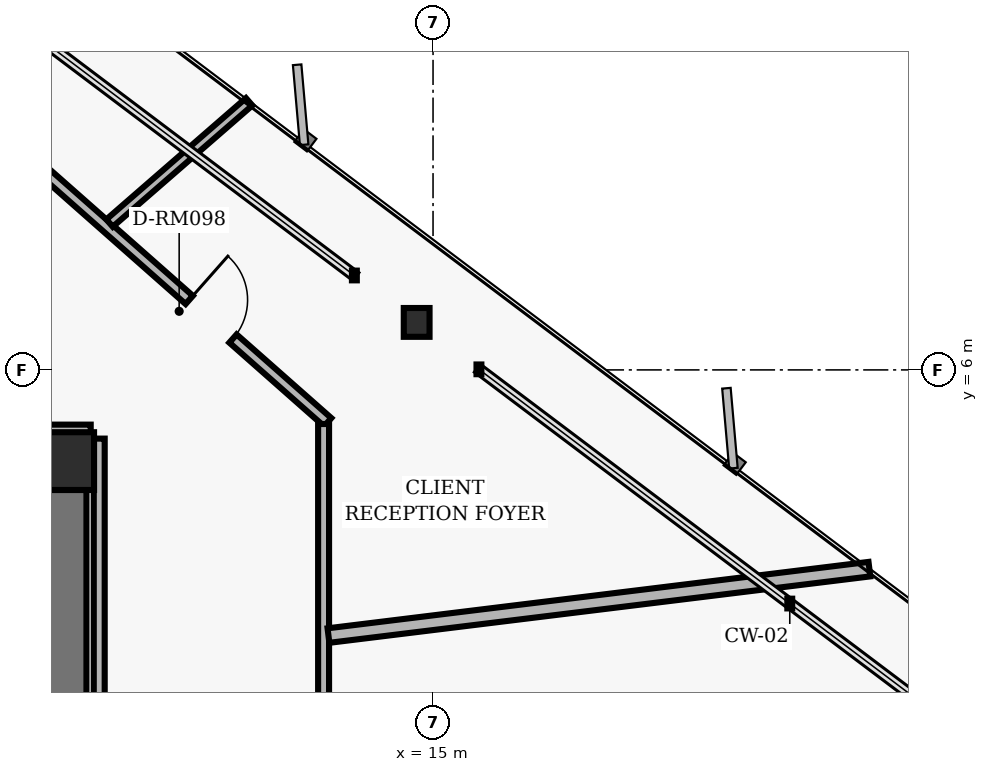
"""IFC4 building model, lengths in metres.
Left out: names, types, materials, properties, quantities, classifications, styles, units other than length and angle.
Written with IfcOpenShell. Run it as: python <this file> out.ifc"""

import sys

from ifc_helpers import new_model, si_unit, direction, frame, frame_2d, origin, origin_2d, place, context, subcontext, project, spatial, rectangle, hollow_rectangle, i_section, extrude, element, fill, save


model = new_model("IFC4")
c1 = context("Model", 3, precision=1e-05, world=origin(), true_north=direction((0.0, 1.0)))
c2 = subcontext(c1, "Body", "Model", "MODEL_VIEW")
j1 = project(units=[si_unit("LENGTHUNIT", "METRE"), si_unit("PLANEANGLEUNIT", "RADIAN")], contexts=[c1])
p1 = place(None, origin())
s1 = spatial("IfcSite", under=j1, at=p1, CompositionType="ELEMENT")
p2 = place(p1, origin())
s2 = spatial("IfcBuilding", under=s1, at=p2, CompositionType="ELEMENT")
p3 = place(p2, frame((0.0, 0.0, 59.68)))
s3 = spatial("IfcBuildingStorey", under=s2, at=p3, CompositionType="ELEMENT", Elevation=59.68)
p4 = place(p3, frame((8.95, 4.5, 0.0), z_axis=(0.0, 0.0, 1.0), x_axis=(1.0, 0.0, 0.0)))
e1 = element("IfcColumn", 1, at=p4, inside=s3, PredefinedType="COLUMN", context=c2, shape_type="SweptSolid", body=[
    extrude(hollow_rectangle(XDim=0.95, YDim=0.95, WallThickness=0.06, InnerFilletRadius=0.02, OuterFilletRadius=0.04, at=origin_2d()), origin(), (0.0, 0.0, 1.0), 3.36),
])
p5 = place(p3, frame((8.95, -3.825, 0.0), z_axis=(0.0, 0.0, 1.0), x_axis=(0.0, 1.0, 0.0)))
e2 = element("IfcWall", 2, at=p5, inside=s3, PredefinedType="SHEAR", context=c2, shape_type="SweptSolid", body=[
    extrude(rectangle(XDim=7.85, YDim=0.7, at=frame_2d((3.925, 0.0))), origin(), (0.0, 0.0, 1.0), 3.098),
])
p6 = place(p3, frame((14.73, 6.781, 0.0), z_axis=(0.0, 0.0, 1.0), x_axis=(1.0, 0.0, 0.0)))
e3 = element("IfcColumn", 3, at=p6, inside=s3, PredefinedType="COLUMN", context=c2, shape_type="SweptSolid", body=[
    extrude(i_section(OverallWidth=0.424, OverallDepth=0.474, WebThickness=0.048, FlangeThickness=0.077, FilletRadius=0.025, at=origin_2d()), origin(), (0.0, 0.0, 1.0), 3.36),
])
p7 = place(p3, frame((8.567, 9.29, 0.0), z_axis=(0.0, 0.0, 1.0), x_axis=(0.749626463267, -0.66186113768, 0.0)))
e4 = element("IfcWall", 4, at=p7, inside=s3, PredefinedType="PARTITIONING", context=c2, shape_type="SweptSolid", body=[
    extrude(rectangle(XDim=6.27, YDim=0.18, at=frame_2d((3.135, 0.0))), origin(), (0.0, 0.0, 1.0), 2.587),
])
p8 = place(p7, frame((3.232, 0.0, 0.0)))
e5 = element("IfcOpeningElement", 5, at=p8, cuts=e4, PredefinedType="OPENING", context=c2, shape_type="SweptSolid", body=[
    extrude(rectangle(XDim=0.96, YDim=2.02, at=frame_2d((0.48, 1.01))), frame((0.0, 0.1, 0.0), z_axis=(0.0, -1.0, 0.0), x_axis=(1.0, 0.0, 0.0)), (0.0, 0.0, 1.0), 0.2),
])
p9 = place(p3, frame((13.2, 5.11, 0.0), z_axis=(0.0, 0.0, 1.0), x_axis=(0.0, -1.0, 0.0)))
e6 = element("IfcWall", 6, at=p9, inside=s3, PredefinedType="PARTITIONING", context=c2, shape_type="SweptSolid", body=[
    extrude(rectangle(XDim=10.22, YDim=0.18, at=frame_2d((5.11, 0.0))), origin(), (0.0, 0.0, 1.0), 3.073),
])
p10 = place(p9, frame((6.21, 0.0, 0.0)))
e7 = element("IfcOpeningElement", 7, at=p10, cuts=e6, PredefinedType="OPENING", context=c2, shape_type="SweptSolid", body=[
    extrude(rectangle(XDim=1.02, YDim=2.02, at=frame_2d((0.51, 1.01))), frame((0.0, 0.1, 0.0), z_axis=(0.0, -1.0, 0.0), x_axis=(1.0, 0.0, 0.0)), (0.0, 0.0, 1.0), 0.2),
])
p11 = place(p3, frame((9.51, -4.87, 0.0), z_axis=(0.0, 0.0, 1.0), x_axis=(0.0, 1.0, 0.0)))
e8 = element("IfcWall", 8, at=p11, inside=s3, PredefinedType="PARTITIONING", context=c2, shape_type="SweptSolid", body=[
    extrude(rectangle(XDim=9.74, YDim=0.18, at=frame_2d((4.87, 0.0))), origin(), (0.0, 0.0, 1.0), 3.073),
])
p12 = place(p3, frame((9.37, 5.01, 0.0), z_axis=(0.0, 0.0, 1.0), x_axis=(-1.0, 0.0, 0.0)))
e9 = element("IfcWall", 9, at=p12, inside=s3, PredefinedType="PARTITIONING", context=c2, shape_type="SweptSolid", body=[
    extrude(rectangle(XDim=2.808, YDim=0.18, at=frame_2d((1.404, 0.0))), origin(), (0.0, 0.0, 1.0), 3.073),
])
p13 = place(p3, frame((13.28, 1.631, 0.0), z_axis=(0.0, 0.0, 1.0), x_axis=(0.992547039209, 0.121862114529, 0.0)))
e10 = element("IfcWall", 10, at=p13, inside=s3, PredefinedType="PARTITIONING", context=c2, shape_type="SweptSolid", body=[
    extrude(rectangle(XDim=8.963, YDim=0.24, at=frame_2d((4.482, 0.0))), origin(), (0.0, 0.0, 1.0), 3.073),
])
p14 = place(p3, frame((9.68, 8.415, 0.0), z_axis=(0.0, 0.0, 1.0), x_axis=(0.754716123846, 0.656051501337, 0.0)))
e11 = element("IfcWall", 11, at=p14, inside=s3, PredefinedType="PARTITIONING", context=c2, shape_type="SweptSolid", body=[
    extrude(rectangle(XDim=3.041, YDim=0.16, at=frame_2d((1.521, 0.0))), origin(), (0.0, 0.0, 1.0), 3.073),
])
p15 = place(p8, origin())
e12 = element("IfcDoor", 12, at=p15, inside=s3, OperationType="SINGLE_SWING_LEFT", PredefinedType="DOOR", context=c2, shape_type="SweptSolid", body=[
    extrude(rectangle(XDim=0.96, YDim=2.02, at=frame_2d((0.48, 1.01))), frame((0.0, 0.025, 0.0), z_axis=(0.0, -1.0, 0.0), x_axis=(1.0, 0.0, 0.0)), (0.0, 0.0, 1.0), 0.05),
])
fill(e5, e12)
save(model, sys.argv[1])
